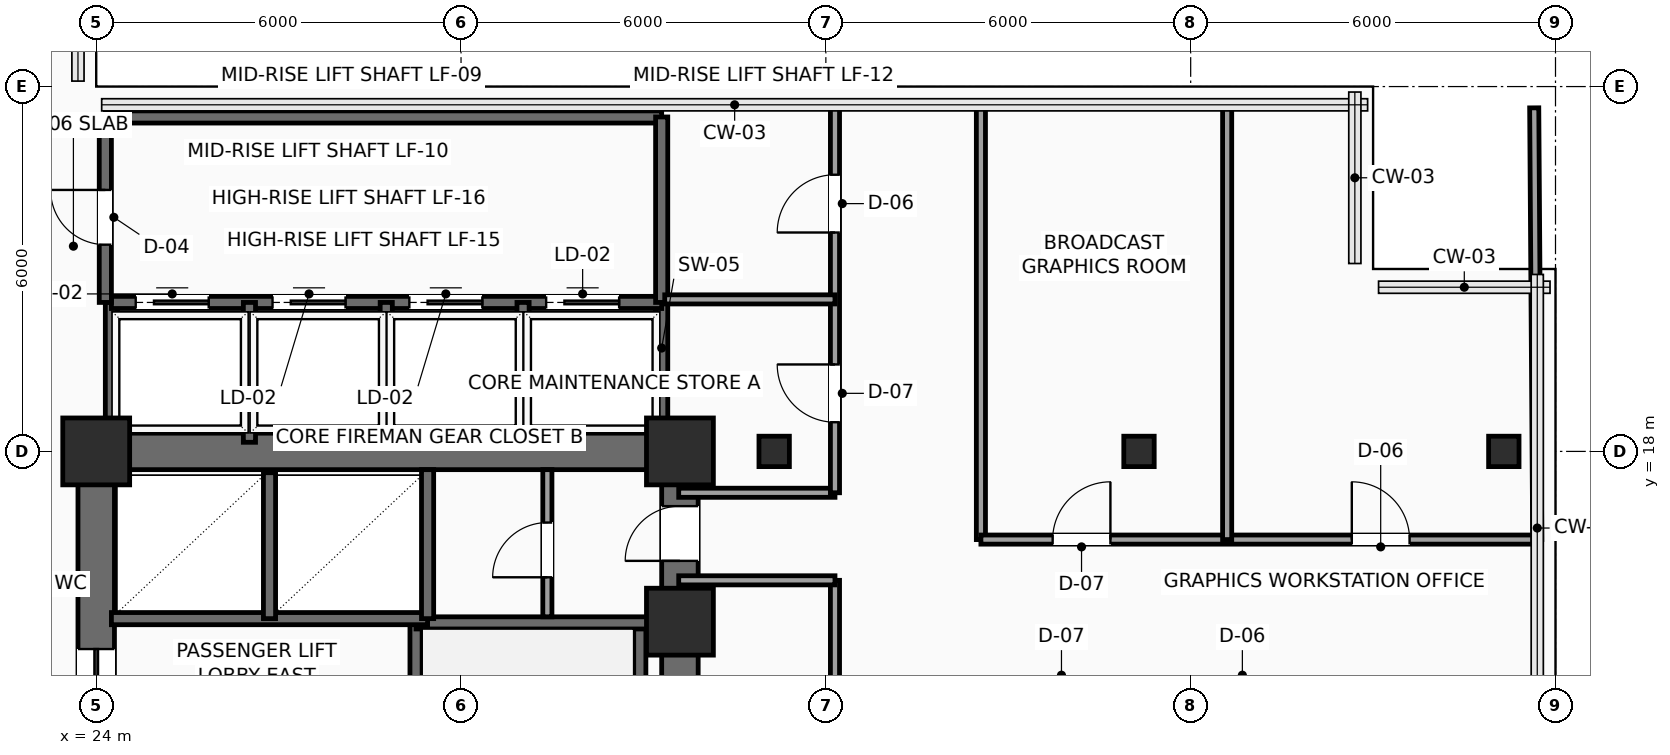
"""IFC4 building model, lengths in metres.
Left out: names, types, materials, properties, quantities, classifications, styles, units other than length and angle.
Written with IfcOpenShell. Run it as: python <this file> out.ifc"""

import sys

from ifc_helpers import new_model, si_unit, direction, frame, frame_2d, origin, origin_2d, place, context, subcontext, project, spatial, rectangle, hollow_rectangle, extrude, element, fill, save


model = new_model("IFC4")
c1 = context("Model", 3, precision=1e-05, world=origin(), true_north=direction((0.0, 1.0)))
c2 = subcontext(c1, "Body", "Model", "MODEL_VIEW")
j1 = project(units=[si_unit("LENGTHUNIT", "METRE"), si_unit("PLANEANGLEUNIT", "RADIAN")], contexts=[c1])
p1 = place(None, origin())
s1 = spatial("IfcSite", under=j1, at=p1, CompositionType="ELEMENT")
p2 = place(p1, origin())
s2 = spatial("IfcBuilding", under=s1, at=p2, CompositionType="ELEMENT")
p3 = place(p2, frame((0.0, 0.0, 160.65)))
s3 = spatial("IfcBuildingStorey", under=s2, at=p3, CompositionType="ELEMENT", Elevation=160.65)
for number, where, z_axis, x_axis in (
    (1, (24.0, 18.0, 0.0), (0.0, 0.0, 1.0), (1.0, 0.0, 0.0)),
    (2, (33.6, 15.2, 0.0), (0.0, 0.0, 1.0), (1.0, 0.0, 0.0)),
    (3, (33.6, 18.0, 0.0), (0.0, 0.0, 1.0), (1.0, 0.0, 0.0)),
):
    element("IfcColumn", number, at=place(p3, frame(where, z_axis=z_axis, x_axis=x_axis)), inside=s3, PredefinedType="COLUMN", context=c2, shape_type="SweptSolid", body=[
        extrude(rectangle(XDim=1.1, YDim=1.1, at=origin_2d()), origin(), (0.0, 0.0, 1.0), 3.75),
    ])
for number, where, z_axis, x_axis in (
    (4, (35.15, 18.0, 0.0), (0.0, 0.0, 1.0), (1.0, 0.0, 0.0)),
    (5, (41.15, 18.0, 0.0), (0.0, 0.0, 1.0), (1.0, 0.0, 0.0)),
    (6, (47.15, 18.0, 0.0), (0.0, 0.0, 1.0), (1.0, 0.0, 0.0)),
):
    element("IfcColumn", number, at=place(p3, frame(where, z_axis=z_axis, x_axis=x_axis)), inside=s3, PredefinedType="COLUMN", context=c2, shape_type="SweptSolid", body=[
        extrude(hollow_rectangle(XDim=0.5, YDim=0.5, WallThickness=0.025, InnerFilletRadius=0.025, OuterFilletRadius=0.04, at=origin_2d()), origin(), (0.0, 0.0, 1.0), 3.75),
    ])
p4 = place(p3, frame((24.0, 18.0, 0.0), z_axis=(0.0, 0.0, 1.0), x_axis=(1.0, 0.0, 0.0)))
e7 = element("IfcWall", 7, at=p4, inside=s3, PredefinedType="SHEAR", context=c2, shape_type="SweptSolid", body=[
    extrude(rectangle(XDim=9.6, YDim=0.6, at=frame_2d((4.8, 0.0))), origin(), (0.0, 0.0, 1.0), 3.425),
])
p5 = place(p3, frame((24.0, 6.0, 0.0), z_axis=(0.0, 0.0, 1.0), x_axis=(0.0, 1.0, 0.0)))
e8 = element("IfcWall", 8, at=p5, inside=s3, PredefinedType="SHEAR", context=c2, shape_type="SweptSolid", body=[
    extrude(rectangle(XDim=12.0, YDim=0.6, at=frame_2d((6.0, 0.0))), origin(), (0.0, 0.0, 1.0), 3.425),
])
p6 = place(p5, frame((7.15, 0.0, 0.0)))
e9 = element("IfcOpeningElement", 9, at=p6, cuts=e8, PredefinedType="OPENING", context=c2, shape_type="SweptSolid", body=[
    extrude(rectangle(XDim=1.6, YDim=2.3, at=frame_2d((0.8, 1.15))), frame((0.0, 0.31, 0.0), z_axis=(0.0, -1.0, 0.0), x_axis=(1.0, 0.0, 0.0)), (0.0, 0.0, 1.0), 0.62),
])
p7 = place(p3, frame((33.6, 6.0, 0.0), z_axis=(0.0, 0.0, 1.0), x_axis=(0.0, 1.0, 0.0)))
e10 = element("IfcWall", 10, at=p7, inside=s3, PredefinedType="SHEAR", context=c2, shape_type="SweptSolid", body=[
    extrude(rectangle(XDim=12.0, YDim=0.6, at=frame_2d((6.0, 0.0))), origin(), (0.0, 0.0, 1.0), 3.425),
])
p8 = place(p7, frame((10.2, 0.0, 0.0)))
e11 = element("IfcOpeningElement", 11, at=p8, cuts=e10, PredefinedType="OPENING", context=c2, shape_type="SweptSolid", body=[
    extrude(rectangle(XDim=0.9, YDim=2.15, at=frame_2d((0.45, 1.075))), frame((0.0, 0.31, 0.0), z_axis=(0.0, -1.0, 0.0), x_axis=(1.0, 0.0, 0.0)), (0.0, 0.0, 1.0), 0.62),
])
p9 = place(p3, frame((29.26, 6.3, 0.0), z_axis=(0.0, 0.0, 1.0), x_axis=(0.0, 1.0, 0.0)))
e12 = element("IfcWall", 12, at=p9, inside=s3, PredefinedType="SHEAR", context=c2, shape_type="SweptSolid", body=[
    extrude(rectangle(XDim=8.88, YDim=0.2, at=frame_2d((4.44, 0.0))), origin(), (0.0, 0.0, 1.0), 3.425),
])
p10 = place(p9, frame((0.35, 0.0, 0.0)))
e13 = element("IfcOpeningElement", 13, at=p10, cuts=e12, PredefinedType="OPENING", context=c2, shape_type="SweptSolid", body=[
    extrude(rectangle(XDim=1.1, YDim=2.2, at=frame_2d((0.55, 1.1))), frame((0.0, 0.11, 0.0), z_axis=(0.0, -1.0, 0.0), x_axis=(1.0, 0.0, 0.0)), (0.0, 0.0, 1.0), 0.22),
])
p11 = place(p3, frame((32.94, 6.3, 0.0), z_axis=(0.0, 0.0, 1.0), x_axis=(0.0, 1.0, 0.0)))
e14 = element("IfcWall", 14, at=p11, inside=s3, PredefinedType="SHEAR", context=c2, shape_type="SweptSolid", body=[
    extrude(rectangle(XDim=8.88, YDim=0.2, at=frame_2d((4.44, 0.0))), origin(), (0.0, 0.0, 1.0), 3.425),
])
p12 = place(p3, frame((29.26, 15.18, 0.0), z_axis=(0.0, 0.0, 1.0), x_axis=(1.0, 0.0, 0.0)))
e15 = element("IfcWall", 15, at=p12, inside=s3, PredefinedType="SHEAR", context=c2, shape_type="SweptSolid", body=[
    extrude(rectangle(XDim=4.04, YDim=0.2, at=frame_2d((2.02, 0.0))), origin(), (0.0, 0.0, 1.0), 3.425),
])
p13 = place(p3, frame((24.25, 15.25, 0.0), z_axis=(0.0, 0.0, 1.0), x_axis=(1.0, 0.0, 0.0)))
e16 = element("IfcWall", 16, at=p13, inside=s3, PredefinedType="SHEAR", context=c2, shape_type="SweptSolid", body=[
    extrude(rectangle(XDim=5.2, YDim=0.2, at=frame_2d((2.6, 0.0))), origin(), (0.0, 0.0, 1.0), 3.425),
])
p14 = place(p3, frame((26.85, 15.25, 0.0), z_axis=(0.0, 0.0, 1.0), x_axis=(0.0, 1.0, 0.0)))
e17 = element("IfcWall", 17, at=p14, inside=s3, PredefinedType="SHEAR", context=c2, shape_type="SweptSolid", body=[
    extrude(rectangle(XDim=2.4, YDim=0.2, at=frame_2d((1.2, 0.0))), origin(), (0.0, 0.0, 1.0), 3.425),
])
p15 = place(p3, frame((29.45, 15.25, 0.0), z_axis=(0.0, 0.0, 1.0), x_axis=(0.0, 1.0, 0.0)))
e18 = element("IfcWall", 18, at=p15, inside=s3, PredefinedType="SHEAR", context=c2, shape_type="SweptSolid", body=[
    extrude(rectangle(XDim=2.45, YDim=0.2, at=frame_2d((1.225, 0.0))), origin(), (0.0, 0.0, 1.0), 3.425),
])
p16 = place(p3, frame((31.42, 15.28, 0.0), z_axis=(0.0, 0.0, 1.0), x_axis=(0.0, 1.0, 0.0)))
e19 = element("IfcWall", 19, at=p16, inside=s3, PredefinedType="PARTITIONING", context=c2, shape_type="SweptSolid", body=[
    extrude(rectangle(XDim=2.42, YDim=0.15, at=frame_2d((1.21, 0.0))), origin(), (0.0, 0.0, 1.0), 3.425),
])
p17 = place(p16, frame((0.65, 0.0, 0.0)))
e20 = element("IfcOpeningElement", 20, at=p17, cuts=e19, PredefinedType="OPENING", context=c2, shape_type="SweptSolid", body=[
    extrude(rectangle(XDim=0.9, YDim=2.15, at=frame_2d((0.45, 1.075))), frame((0.0, 0.085, 0.0), z_axis=(0.0, -1.0, 0.0), x_axis=(1.0, 0.0, 0.0)), (0.0, 0.0, 1.0), 0.17),
])
for number, where, z_axis, x_axis in (
    (21, (33.3, 18.1, 0.0), (0.0, 0.0, 1.0), (0.0, 1.0, 0.0)),
    (22, (24.25, 18.1, 0.0), (0.0, 0.0, 1.0), (0.0, 1.0, 0.0)),
):
    element("IfcWall", number, at=place(p3, frame(where, z_axis=z_axis, x_axis=x_axis)), inside=s3, PredefinedType="SHEAR", context=c2, shape_type="SweptSolid", body=[
        extrude(rectangle(XDim=2.35, YDim=0.2, at=frame_2d((1.175, 0.0))), origin(), (0.0, 0.0, 1.0), 3.425),
    ])
p18 = place(p3, frame((24.25, 20.45, 0.0), z_axis=(0.0, 0.0, 1.0), x_axis=(1.0, 0.0, 0.0)))
e23 = element("IfcWall", 23, at=p18, inside=s3, PredefinedType="SHEAR", context=c2, shape_type="SweptSolid", body=[
    extrude(rectangle(XDim=9.05, YDim=0.2, at=frame_2d((4.525, 0.0))), origin(), (0.0, 0.0, 1.0), 3.425),
])
p19 = place(p18, frame((0.4, 0.0, 0.0)))
e24 = element("IfcOpeningElement", 24, at=p19, cuts=e23, PredefinedType="OPENING", context=c2, shape_type="SweptSolid", body=[
    extrude(rectangle(XDim=1.2, YDim=2.2, at=frame_2d((0.6, 1.1))), frame((0.0, 0.11, 0.0), z_axis=(0.0, -1.0, 0.0), x_axis=(1.0, 0.0, 0.0)), (0.0, 0.0, 1.0), 0.22),
])
p20 = place(p18, frame((2.65, 0.0, 0.0)))
e25 = element("IfcOpeningElement", 25, at=p20, cuts=e23, PredefinedType="OPENING", context=c2, shape_type="SweptSolid", body=[
    extrude(rectangle(XDim=1.2, YDim=2.2, at=frame_2d((0.6, 1.1))), frame((0.0, 0.11, 0.0), z_axis=(0.0, -1.0, 0.0), x_axis=(1.0, 0.0, 0.0)), (0.0, 0.0, 1.0), 0.22),
])
p21 = place(p18, frame((4.9, 0.0, 0.0)))
e26 = element("IfcOpeningElement", 26, at=p21, cuts=e23, PredefinedType="OPENING", context=c2, shape_type="SweptSolid", body=[
    extrude(rectangle(XDim=1.2, YDim=2.2, at=frame_2d((0.6, 1.1))), frame((0.0, 0.11, 0.0), z_axis=(0.0, -1.0, 0.0), x_axis=(1.0, 0.0, 0.0)), (0.0, 0.0, 1.0), 0.22),
])
p22 = place(p18, frame((7.15, 0.0, 0.0)))
e27 = element("IfcOpeningElement", 27, at=p22, cuts=e23, PredefinedType="OPENING", context=c2, shape_type="SweptSolid", body=[
    extrude(rectangle(XDim=1.2, YDim=2.2, at=frame_2d((0.6, 1.1))), frame((0.0, 0.11, 0.0), z_axis=(0.0, -1.0, 0.0), x_axis=(1.0, 0.0, 0.0)), (0.0, 0.0, 1.0), 0.22),
])
for number, where, z_axis, x_axis in (
    (28, (26.52, 18.15, 0.0), (0.0, 0.0, 1.0), (0.0, 1.0, 0.0)),
    (29, (28.77, 18.15, 0.0), (0.0, 0.0, 1.0), (0.0, 1.0, 0.0)),
    (30, (31.02, 18.15, 0.0), (0.0, 0.0, 1.0), (0.0, 1.0, 0.0)),
):
    element("IfcWall", number, at=place(p3, frame(where, z_axis=z_axis, x_axis=x_axis)), inside=s3, PredefinedType="SHEAR", context=c2, shape_type="SweptSolid", body=[
        extrude(rectangle(XDim=2.3, YDim=0.2, at=frame_2d((1.15, 0.0))), origin(), (0.0, 0.0, 1.0), 3.425),
    ])
p23 = place(p3, frame((24.15, 23.5, 0.0), z_axis=(0.0, 0.0, 1.0), x_axis=(1.0, 0.0, 0.0)))
e31 = element("IfcWall", 31, at=p23, inside=s3, PredefinedType="SHEAR", context=c2, shape_type="SweptSolid", body=[
    extrude(rectangle(XDim=9.15, YDim=0.2, at=frame_2d((4.575, 0.0))), origin(), (0.0, 0.0, 1.0), 3.425),
])
p24 = place(p3, frame((33.3, 20.45, 0.0), z_axis=(0.0, 0.0, 1.0), x_axis=(0.0, 1.0, 0.0)))
e32 = element("IfcWall", 32, at=p24, inside=s3, PredefinedType="SHEAR", context=c2, shape_type="SweptSolid", body=[
    extrude(rectangle(XDim=3.05, YDim=0.2, at=frame_2d((1.525, 0.0))), origin(), (0.0, 0.0, 1.0), 3.425),
])
p25 = place(p3, frame((24.15, 20.45, 0.0), z_axis=(0.0, 0.0, 1.0), x_axis=(0.0, 1.0, 0.0)))
e33 = element("IfcWall", 33, at=p25, inside=s3, PredefinedType="SHEAR", context=c2, shape_type="SweptSolid", body=[
    extrude(rectangle(XDim=3.05, YDim=0.2, at=frame_2d((1.525, 0.0))), origin(), (0.0, 0.0, 1.0), 3.425),
])
p26 = place(p25, frame((0.95, 0.0, 0.0)))
e34 = element("IfcOpeningElement", 34, at=p26, cuts=e33, PredefinedType="OPENING", context=c2, shape_type="SweptSolid", body=[
    extrude(rectangle(XDim=0.9, YDim=2.15, at=frame_2d((0.45, 1.075))), frame((0.0, 0.11, 0.0), z_axis=(0.0, -1.0, 0.0), x_axis=(1.0, 0.0, 0.0)), (0.0, 0.0, 1.0), 0.22),
])
p27 = place(p3, frame((36.15, 5.8, 0.0), z_axis=(0.0, 0.0, 1.0), x_axis=(0.0, 1.0, 0.0)))
e35 = element("IfcWall", 35, at=p27, inside=s3, PredefinedType="PARTITIONING", context=c2, shape_type="SweptSolid", body=[
    extrude(rectangle(XDim=10.08, YDim=0.15, at=frame_2d((5.04, 0.0))), origin(), (0.0, 0.0, 1.0), 3.425),
])
p28 = place(p27, frame((4.48, 0.0, 0.0)))
e36 = element("IfcOpeningElement", 36, at=p28, cuts=e35, PredefinedType="OPENING", context=c2, shape_type="SweptSolid", body=[
    extrude(rectangle(XDim=0.95, YDim=2.15, at=frame_2d((0.475, 1.075))), frame((0.0, 0.085, 0.0), z_axis=(0.0, -1.0, 0.0), x_axis=(1.0, 0.0, 0.0)), (0.0, 0.0, 1.0), 0.17),
])
for number, where, z_axis, x_axis in (
    (37, (36.15, 15.88, 0.0), (0.0, 0.0, 1.0), (-1.0, 0.0, 0.0)),
    (38, (33.58, 17.32, 0.0), (0.0, 0.0, 1.0), (1.0, 0.0, 0.0)),
):
    element("IfcWall", number, at=place(p3, frame(where, z_axis=z_axis, x_axis=x_axis)), inside=s3, PredefinedType="PARTITIONING", context=c2, shape_type="SweptSolid", body=[
        extrude(rectangle(XDim=2.57, YDim=0.15, at=frame_2d((1.285, 0.0))), origin(), (0.0, 0.0, 1.0), 3.425),
    ])
p29 = place(p3, frame((36.15, 17.32, 0.0), z_axis=(0.0, 0.0, 1.0), x_axis=(0.0, 1.0, 0.0)))
e39 = element("IfcWall", 39, at=p29, inside=s3, PredefinedType="PARTITIONING", context=c2, shape_type="SweptSolid", body=[
    extrude(rectangle(XDim=6.38, YDim=0.15, at=frame_2d((3.19, 0.0))), origin(), (0.0, 0.0, 1.0), 3.425),
])
p30 = place(p29, frame((1.16, 0.0, 0.0)))
e40 = element("IfcOpeningElement", 40, at=p30, cuts=e39, PredefinedType="OPENING", context=c2, shape_type="SweptSolid", body=[
    extrude(rectangle(XDim=0.95, YDim=2.15, at=frame_2d((0.475, 1.075))), frame((0.0, 0.085, 0.0), z_axis=(0.0, -1.0, 0.0), x_axis=(1.0, 0.0, 0.0)), (0.0, 0.0, 1.0), 0.17),
])
p31 = place(p29, frame((4.28, 0.0, 0.0)))
e41 = element("IfcOpeningElement", 41, at=p31, cuts=e39, PredefinedType="OPENING", context=c2, shape_type="SweptSolid", body=[
    extrude(rectangle(XDim=0.95, YDim=2.15, at=frame_2d((0.475, 1.075))), frame((0.0, 0.085, 0.0), z_axis=(0.0, -1.0, 0.0), x_axis=(1.0, 0.0, 0.0)), (0.0, 0.0, 1.0), 0.17),
])
p32 = place(p3, frame((38.55, 23.7, 0.0), z_axis=(0.0, 0.0, 1.0), x_axis=(0.0, -1.0, 0.0)))
e42 = element("IfcWall", 42, at=p32, inside=s3, PredefinedType="PARTITIONING", context=c2, shape_type="SweptSolid", body=[
    extrude(rectangle(XDim=7.15, YDim=0.15, at=frame_2d((3.575, 0.0))), origin(), (0.0, 0.0, 1.0), 3.425),
])
p33 = place(p3, frame((38.55, 16.55, 0.0), z_axis=(0.0, 0.0, 1.0), x_axis=(1.0, 0.0, 0.0)))
e43 = element("IfcWall", 43, at=p33, inside=s3, PredefinedType="PARTITIONING", context=c2, shape_type="SweptSolid", body=[
    extrude(rectangle(XDim=9.15, YDim=0.15, at=frame_2d((4.575, 0.0))), origin(), (0.0, 0.0, 1.0), 3.425),
])
p34 = place(p33, frame((1.18, 0.0, 0.0)))
e44 = element("IfcOpeningElement", 44, at=p34, cuts=e43, PredefinedType="OPENING", context=c2, shape_type="SweptSolid", body=[
    extrude(rectangle(XDim=0.95, YDim=2.15, at=frame_2d((0.475, 1.075))), frame((0.0, 0.085, 0.0), z_axis=(0.0, -1.0, 0.0), x_axis=(1.0, 0.0, 0.0)), (0.0, 0.0, 1.0), 0.17),
])
p35 = place(p33, frame((6.1, 0.0, 0.0)))
e45 = element("IfcOpeningElement", 45, at=p35, cuts=e43, PredefinedType="OPENING", context=c2, shape_type="SweptSolid", body=[
    extrude(rectangle(XDim=0.95, YDim=2.15, at=frame_2d((0.475, 1.075))), frame((0.0, 0.085, 0.0), z_axis=(0.0, -1.0, 0.0), x_axis=(1.0, 0.0, 0.0)), (0.0, 0.0, 1.0), 0.17),
])
p36 = place(p3, frame((33.35, 20.5, 0.0), z_axis=(0.0, 0.0, 1.0), x_axis=(1.0, 0.0, 0.0)))
e46 = element("IfcWall", 46, at=p36, inside=s3, PredefinedType="PARTITIONING", context=c2, shape_type="SweptSolid", body=[
    extrude(rectangle(XDim=2.8, YDim=0.15, at=frame_2d((1.4, 0.0))), origin(), (0.0, 0.0, 1.0), 3.425),
])
p37 = place(p3, frame((42.6, 16.55, 0.0), z_axis=(0.0, 0.0, 1.0), x_axis=(0.0, 1.0, 0.0)))
e47 = element("IfcWall", 47, at=p37, inside=s3, PredefinedType="PARTITIONING", context=c2, shape_type="SweptSolid", body=[
    extrude(rectangle(XDim=7.15, YDim=0.15, at=frame_2d((3.575, 0.0))), origin(), (0.0, 0.0, 1.0), 3.425),
])
p38 = place(p3, frame((47.7, 16.55, 0.0), z_axis=(0.0, 0.0, 1.0), x_axis=(-0.007049101019, 0.999975154779, 0.0)))
e48 = element("IfcWall", 48, at=p38, inside=s3, PredefinedType="PARTITIONING", context=c2, shape_type="SweptSolid", body=[
    extrude(rectangle(XDim=7.1, YDim=0.15, at=frame_2d((3.55, 0.0))), origin(), (0.0, 0.0, 1.0), 3.425),
])
p39 = place(p6, origin())
e49 = element("IfcDoor", 49, at=p39, inside=s3, OperationType="DOUBLE_DOOR_SLIDING", PredefinedType="DOOR", context=c2, shape_type="SweptSolid", body=[
    extrude(rectangle(XDim=1.6, YDim=2.3, at=frame_2d((0.8, 1.15))), frame((0.0, 0.025, 0.0), z_axis=(0.0, -1.0, 0.0), x_axis=(1.0, 0.0, 0.0)), (0.0, 0.0, 1.0), 0.05),
])
fill(e9, e49)
p40 = place(p8, origin())
e50 = element("IfcDoor", 50, at=p40, inside=s3, OperationType="SINGLE_SWING_LEFT", PredefinedType="DOOR", context=c2, shape_type="SweptSolid", body=[
    extrude(rectangle(XDim=0.9, YDim=2.15, at=frame_2d((0.45, 1.075))), frame((0.0, 0.025, 0.0), z_axis=(0.0, -1.0, 0.0), x_axis=(1.0, 0.0, 0.0)), (0.0, 0.0, 1.0), 0.05),
])
fill(e11, e50)
p41 = place(p17, origin())
e51 = element("IfcDoor", 51, at=p41, inside=s3, OperationType="SINGLE_SWING_LEFT", PredefinedType="DOOR", context=c2, shape_type="SweptSolid", body=[
    extrude(rectangle(XDim=0.9, YDim=2.15, at=frame_2d((0.45, 1.075))), frame((0.0, 0.025, 0.0), z_axis=(0.0, -1.0, 0.0), x_axis=(1.0, 0.0, 0.0)), (0.0, 0.0, 1.0), 0.05),
])
fill(e20, e51)
p42 = place(p19, origin())
e52 = element("IfcDoor", 52, at=p42, inside=s3, OperationType="SLIDING_TO_RIGHT", PredefinedType="DOOR", context=c2, shape_type="SweptSolid", body=[
    extrude(rectangle(XDim=1.2, YDim=2.2, at=frame_2d((0.6, 1.1))), frame((0.0, 0.025, 0.0), z_axis=(0.0, -1.0, 0.0), x_axis=(1.0, 0.0, 0.0)), (0.0, 0.0, 1.0), 0.05),
])
fill(e24, e52)
p43 = place(p20, origin())
e53 = element("IfcDoor", 53, at=p43, inside=s3, OperationType="SLIDING_TO_RIGHT", PredefinedType="DOOR", context=c2, shape_type="SweptSolid", body=[
    extrude(rectangle(XDim=1.2, YDim=2.2, at=frame_2d((0.6, 1.1))), frame((0.0, 0.025, 0.0), z_axis=(0.0, -1.0, 0.0), x_axis=(1.0, 0.0, 0.0)), (0.0, 0.0, 1.0), 0.05),
])
fill(e25, e53)
p44 = place(p21, origin())
e54 = element("IfcDoor", 54, at=p44, inside=s3, OperationType="SLIDING_TO_RIGHT", PredefinedType="DOOR", context=c2, shape_type="SweptSolid", body=[
    extrude(rectangle(XDim=1.2, YDim=2.2, at=frame_2d((0.6, 1.1))), frame((0.0, 0.025, 0.0), z_axis=(0.0, -1.0, 0.0), x_axis=(1.0, 0.0, 0.0)), (0.0, 0.0, 1.0), 0.05),
])
fill(e26, e54)
p45 = place(p22, origin())
e55 = element("IfcDoor", 55, at=p45, inside=s3, OperationType="SLIDING_TO_RIGHT", PredefinedType="DOOR", context=c2, shape_type="SweptSolid", body=[
    extrude(rectangle(XDim=1.2, YDim=2.2, at=frame_2d((0.6, 1.1))), frame((0.0, 0.025, 0.0), z_axis=(0.0, -1.0, 0.0), x_axis=(1.0, 0.0, 0.0)), (0.0, 0.0, 1.0), 0.05),
])
fill(e27, e55)
p46 = place(p26, origin())
e56 = element("IfcDoor", 56, at=p46, inside=s3, OperationType="SINGLE_SWING_RIGHT", PredefinedType="DOOR", context=c2, shape_type="SweptSolid", body=[
    extrude(rectangle(XDim=0.9, YDim=2.15, at=frame_2d((0.45, 1.075))), frame((0.0, 0.025, 0.0), z_axis=(0.0, -1.0, 0.0), x_axis=(1.0, 0.0, 0.0)), (0.0, 0.0, 1.0), 0.05),
])
fill(e34, e56)
p47 = place(p30, origin())
e57 = element("IfcDoor", 57, at=p47, inside=s3, OperationType="SINGLE_SWING_RIGHT", PredefinedType="DOOR", context=c2, shape_type="SweptSolid", body=[
    extrude(rectangle(XDim=0.95, YDim=2.15, at=frame_2d((0.475, 1.075))), frame((0.0, 0.025, 0.0), z_axis=(0.0, -1.0, 0.0), x_axis=(1.0, 0.0, 0.0)), (0.0, 0.0, 1.0), 0.05),
])
fill(e40, e57)
p48 = place(p31, origin())
e58 = element("IfcDoor", 58, at=p48, inside=s3, OperationType="SINGLE_SWING_LEFT", PredefinedType="DOOR", context=c2, shape_type="SweptSolid", body=[
    extrude(rectangle(XDim=0.95, YDim=2.15, at=frame_2d((0.475, 1.075))), frame((0.0, 0.025, 0.0), z_axis=(0.0, -1.0, 0.0), x_axis=(1.0, 0.0, 0.0)), (0.0, 0.0, 1.0), 0.05),
])
fill(e41, e58)
p49 = place(p34, origin())
e59 = element("IfcDoor", 59, at=p49, inside=s3, OperationType="SINGLE_SWING_RIGHT", PredefinedType="DOOR", context=c2, shape_type="SweptSolid", body=[
    extrude(rectangle(XDim=0.95, YDim=2.15, at=frame_2d((0.475, 1.075))), frame((0.0, 0.025, 0.0), z_axis=(0.0, -1.0, 0.0), x_axis=(1.0, 0.0, 0.0)), (0.0, 0.0, 1.0), 0.05),
])
fill(e44, e59)
p50 = place(p35, origin())
e60 = element("IfcDoor", 60, at=p50, inside=s3, OperationType="SINGLE_SWING_LEFT", PredefinedType="DOOR", context=c2, shape_type="SweptSolid", body=[
    extrude(rectangle(XDim=0.95, YDim=2.15, at=frame_2d((0.475, 1.075))), frame((0.0, 0.025, 0.0), z_axis=(0.0, -1.0, 0.0), x_axis=(1.0, 0.0, 0.0)), (0.0, 0.0, 1.0), 0.05),
])
fill(e45, e60)
save(model, sys.argv[1])
